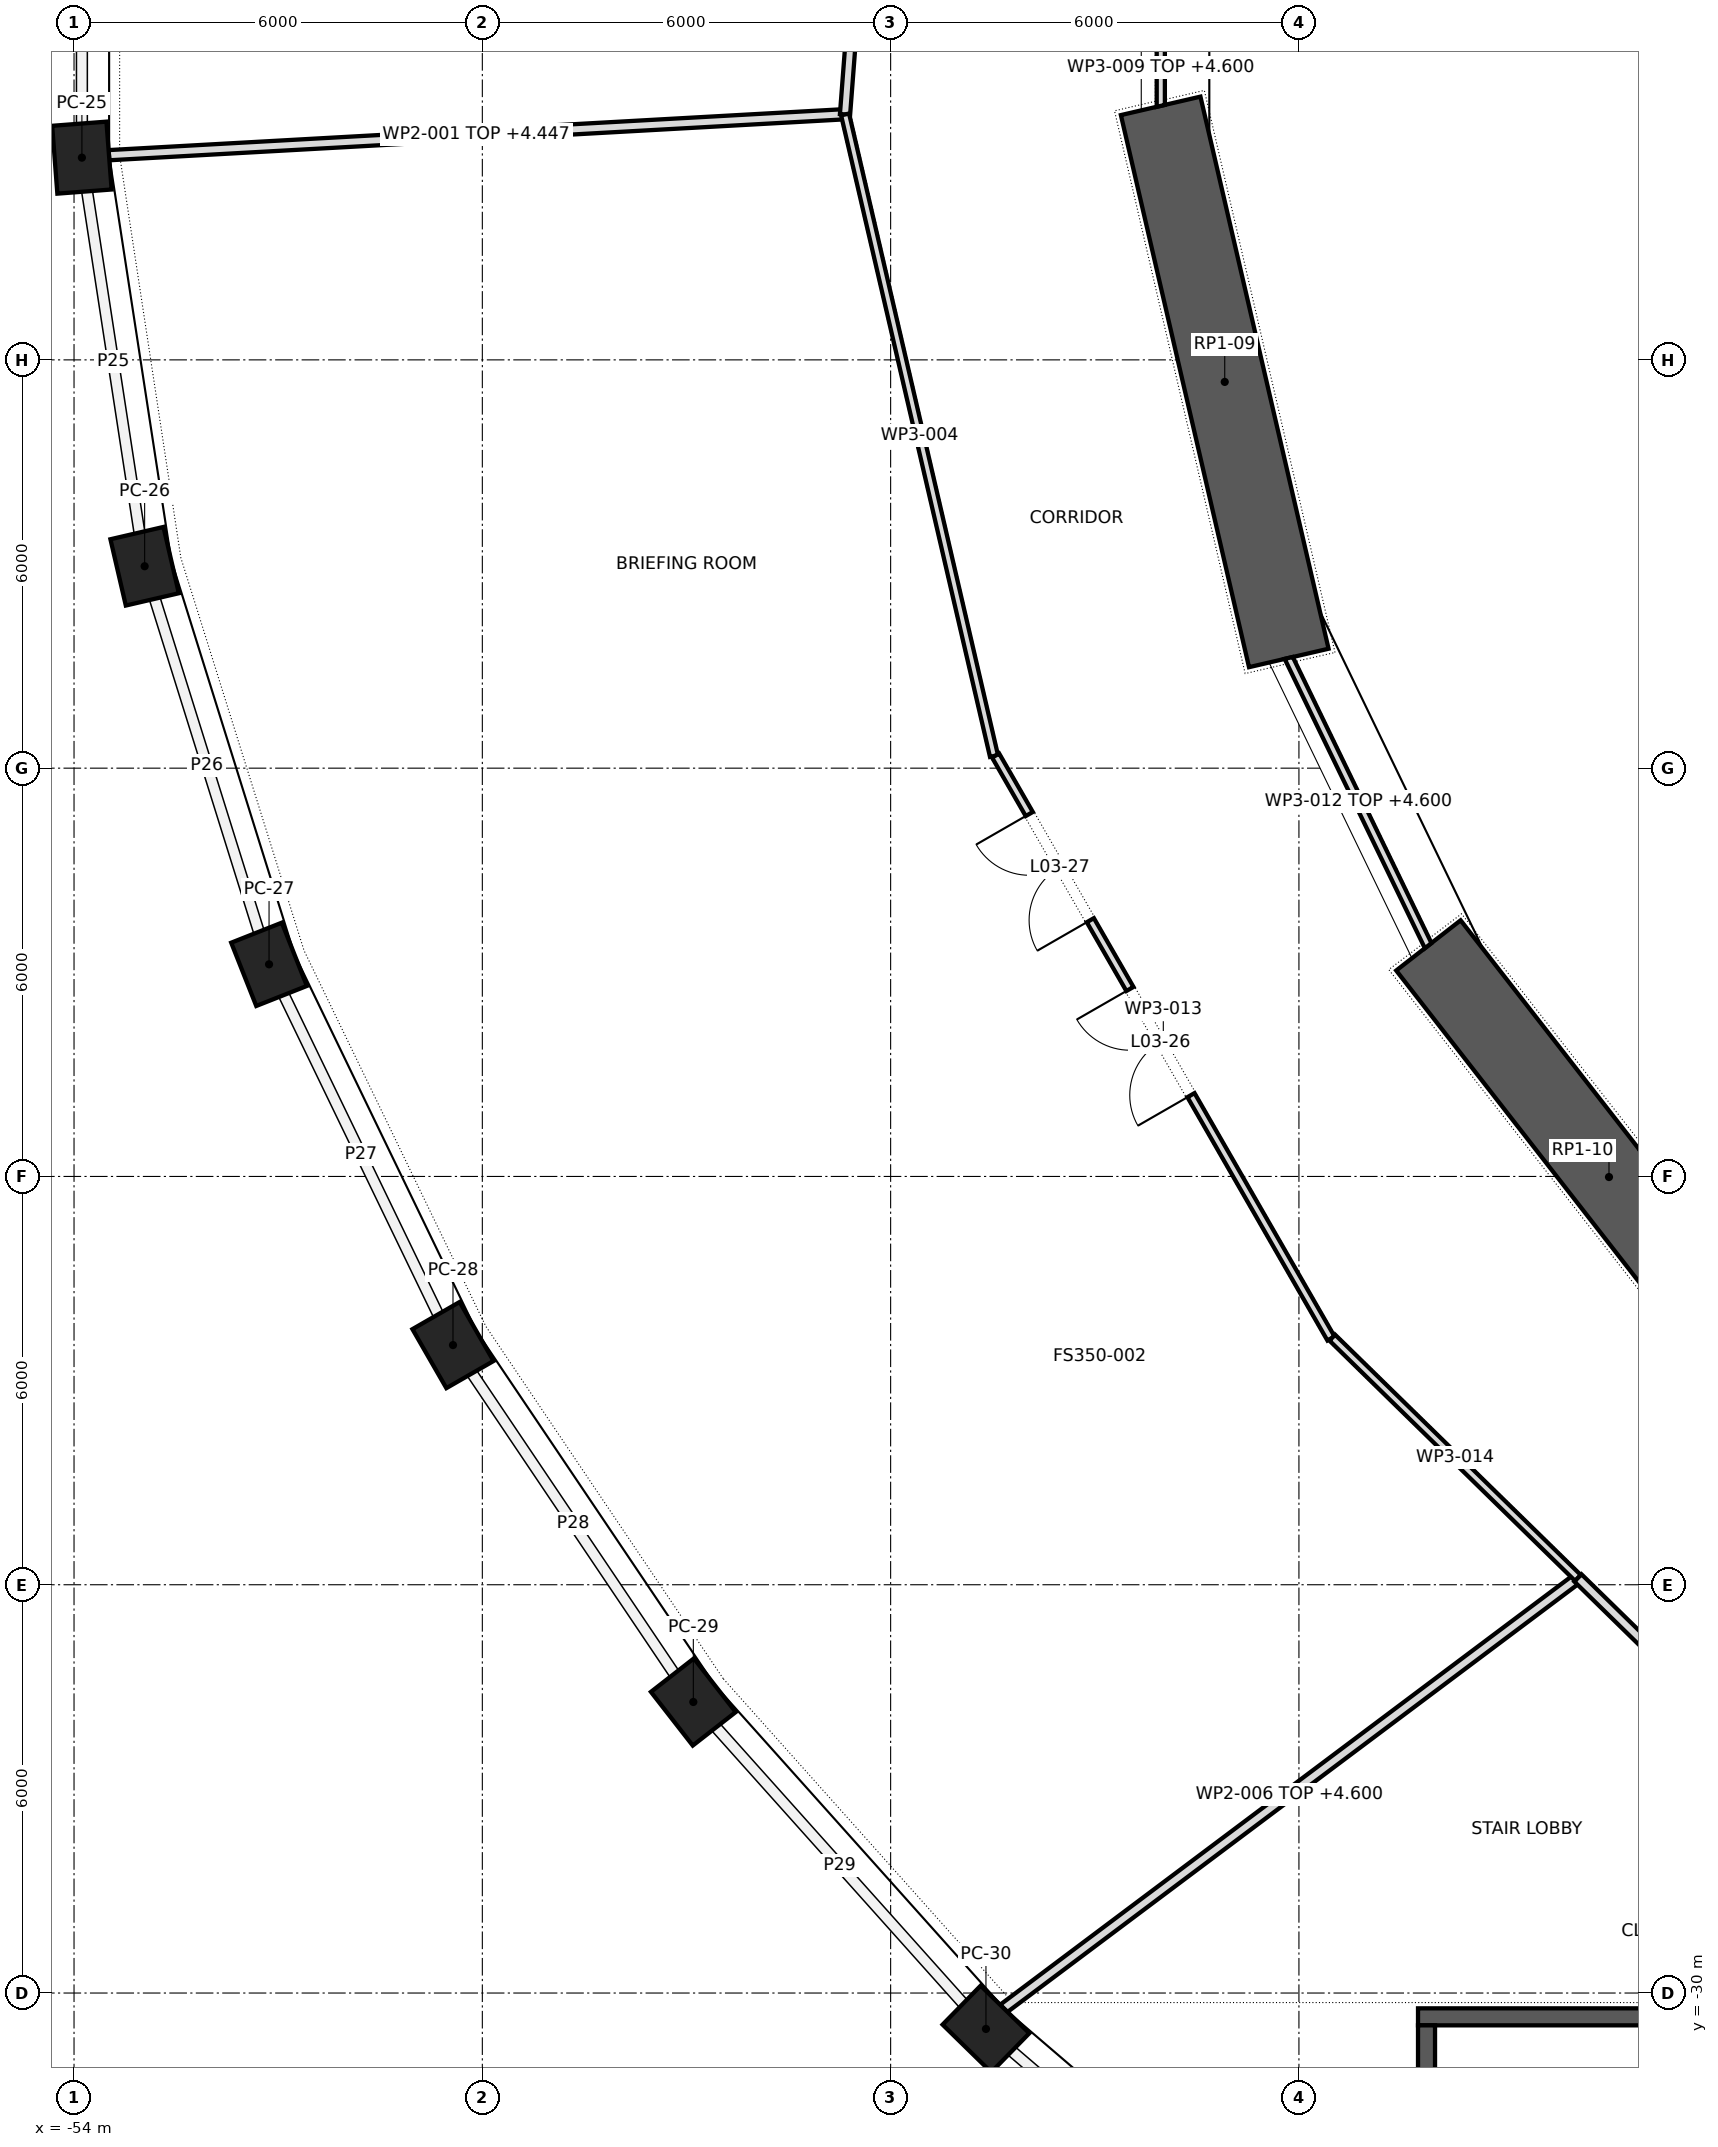
"""IFC4 building model, lengths in metres.
Left out: names, types, materials, properties, quantities, classifications, styles, units other than length and angle.
Written with IfcOpenShell. Run it as: python <this file> out.ifc"""

import sys

from ifc_helpers import new_model, si_unit, direction, frame, frame_2d, origin, origin_2d, place, context, subcontext, project, spatial, polyline, rectangle, outline, extrude, element, fill, save


model = new_model("IFC4")
c1 = context("Model", 3, precision=1e-05, world=origin(), true_north=direction((0.0, 1.0)))
c2 = subcontext(c1, "Body", "Model", "MODEL_VIEW")
j1 = project(units=[si_unit("LENGTHUNIT", "METRE"), si_unit("PLANEANGLEUNIT", "RADIAN")], contexts=[c1])
p1 = place(None, origin())
s1 = spatial("IfcSite", under=j1, at=p1, CompositionType="ELEMENT")
p2 = place(p1, origin())
s2 = spatial("IfcBuilding", under=s1, at=p2, CompositionType="ELEMENT")
p3 = place(p2, frame((0.0, 0.0, 18.0)))
s3 = spatial("IfcBuildingStorey", under=s2, at=p3, CompositionType="ELEMENT", Elevation=18.0)
for number, where, z_axis, x_axis in (
    (1, (-53.885, -3.028, 0.0), (0.0, 0.0, 1.0), (0.076, -0.997, 0.0)),
    (2, (-52.962, -9.033, 0.0), (0.0, 0.0, 1.0), (0.226, -0.974, 0.0)),
    (3, (-51.134, -14.883, 0.0), (0.0, 0.0, 1.0), (0.368, -0.93, 0.0)),
    (4, (-48.431, -20.478, 0.0), (0.0, 0.0, 1.0), (0.499, -0.867, 0.0)),
    (5, (-44.899, -25.723, 0.0), (0.0, 0.0, 1.0), (0.615, -0.789, 0.0)),
    (6, (-40.599, -30.528, 0.0), (0.0, 0.0, 1.0), (0.715, -0.699, 0.0)),
):
    element("IfcColumn", number, at=place(p3, frame(where, z_axis=z_axis, x_axis=x_axis)), inside=s3, PredefinedType="COLUMN", context=c2, shape_type="SweptSolid", body=[
        extrude(rectangle(XDim=1.0, YDim=0.8, at=origin_2d()), origin(), (0.0, 0.0, 1.0), 5.5),
    ])
p4 = place(p3, frame((-38.032, -2.267, 0.0), z_axis=(0.0, 0.0, 1.0), x_axis=(0.226058185805, -0.974113800657, 0.0)))
e7 = element("IfcWall", 7, at=p4, inside=s3, PredefinedType="SHEAR", context=c2, shape_type="SweptSolid", body=[
    extrude(rectangle(XDim=8.329, YDim=1.2, at=frame_2d((4.165, 0.0))), origin(), (0.0, 0.0, 1.0), 5.5),
])
p5 = place(p3, frame((-34.097, -14.605, 0.0), z_axis=(0.0, 0.0, 1.0), x_axis=(0.614825322247, -0.788663314174, 0.0)))
e8 = element("IfcWall", 8, at=p5, inside=s3, PredefinedType="SHEAR", context=c2, shape_type="SweptSolid", body=[
    extrude(rectangle(XDim=8.632, YDim=1.2, at=frame_2d((4.316, 0.0))), origin(), (0.0, 0.0, 1.0), 5.5),
])
p6 = place(p3, frame((-34.25, -30.35, 0.0), z_axis=(0.0, 0.0, 1.0), x_axis=(1.0, 0.0, 0.0)))
e9 = element("IfcWall", 9, at=p6, inside=s3, PredefinedType="SHEAR", context=c2, shape_type="SweptSolid", body=[
    extrude(rectangle(XDim=8.5, YDim=0.25, at=frame_2d((4.25, 0.0))), origin(), (0.0, 0.0, 1.0), 5.2),
])
p7 = place(p3, frame((-34.125, -33.525, 0.0), z_axis=(0.0, 0.0, 1.0), x_axis=(0.0, 1.0, 0.0)))
e10 = element("IfcWall", 10, at=p7, inside=s3, PredefinedType="SHEAR", context=c2, shape_type="SweptSolid", body=[
    extrude(rectangle(XDim=3.05, YDim=0.25, at=frame_2d((1.525, 0.0))), origin(), (0.0, 0.0, 1.0), 5.2),
])
p8 = place(p3, frame((-42.697, -2.392, 0.0), z_axis=(0.0, 0.0, 1.0), x_axis=(-0.998455831687, -0.055551347153, 0.0)))
e11 = element("IfcWall", 11, at=p8, inside=s3, PredefinedType="PARTITIONING", context=c2, shape_type="SweptSolid", body=[
    extrude(outline(polyline([(0.0, -0.075), (10.808, -0.075), (10.805, 0.075), (0.0, 0.075), (0.0, -0.075)])), origin(), (0.0, 0.0, 1.0), 4.447),
])
p9 = place(p3, frame((-42.67, -2.394, 0.0), z_axis=(0.0, 0.0, 1.0), x_axis=(0.076458757176, 0.997072744814, 0.0)))
e12 = element("IfcWall", 12, at=p9, inside=s3, PredefinedType="PARTITIONING", context=c2, shape_type="SweptSolid", body=[
    extrude(rectangle(XDim=9.659, YDim=0.15, at=frame_2d((4.83, 0.0))), origin(), (0.0, 0.0, 1.0), 5.2),
])
p10 = place(p3, frame((-40.481, -11.821, 0.0), z_axis=(0.0, 0.0, 1.0), x_axis=(-0.226066022298, 0.974111982044, 0.0)))
e13 = element("IfcWall", 13, at=p10, inside=s3, PredefinedType="PARTITIONING", context=c2, shape_type="SweptSolid", body=[
    extrude(rectangle(XDim=9.678, YDim=0.12, at=frame_2d((4.839, 0.0))), origin(), (0.0, 0.0, 1.0), 5.2),
])
p11 = place(p3, frame((-40.337, -30.226, 0.0), z_axis=(0.0, 0.0, 1.0), x_axis=(0.800114543622, 0.599847244792, 0.0)))
e14 = element("IfcWall", 14, at=p11, inside=s3, PredefinedType="PARTITIONING", context=c2, shape_type="SweptSolid", body=[
    extrude(outline(polyline([(0.011, -0.075), (10.485, -0.075), (10.485, 0.075), (-0.011, 0.075), (0.011, -0.075)])), origin(), (0.0, 0.0, 1.0), 4.6),
])
p12 = place(p3, frame((-38.03, -1.14, 0.0), z_axis=(0.0, 0.0, 1.0), x_axis=(0.0, -1.0, 0.0)))
e15 = element("IfcWall", 15, at=p12, inside=s3, PredefinedType="PARTITIONING", context=c2, shape_type="SweptSolid", body=[
    extrude(outline(polyline([(0.0, -0.06), (1.142, -0.06), (1.114, 0.06), (0.0, 0.06), (0.0, -0.06)])), origin(), (0.0, 0.0, 1.0), 4.6),
])
p13 = place(p3, frame((-36.15, -10.38, 0.0), z_axis=(0.0, 0.0, 1.0), x_axis=(0.436102687495, -0.899896908518, 0.0)))
e16 = element("IfcWall", 16, at=p13, inside=s3, PredefinedType="PARTITIONING", context=c2, shape_type="SweptSolid", body=[
    extrude(outline(polyline([(-0.014, -0.06), (4.712, -0.06), (4.686, 0.06), (0.014, 0.06), (-0.014, -0.06)])), origin(), (0.0, 0.0, 1.0), 4.6),
])
p14 = place(p3, frame((-35.529, -20.381, 0.0), z_axis=(0.0, 0.0, 1.0), x_axis=(-0.498637746392, 0.866810474021, 0.0)))
e17 = element("IfcWall", 17, at=p14, inside=s3, PredefinedType="PARTITIONING", context=c2, shape_type="SweptSolid", body=[
    extrude(rectangle(XDim=9.882, YDim=0.12, at=frame_2d((4.941, 0.0))), origin(), (0.0, 0.0, 1.0), 5.2),
])
p15 = place(p14, frame((4.125, 0.0, 0.0)))
e18 = element("IfcOpeningElement", 18, at=p15, cuts=e17, PredefinedType="OPENING", context=c2, shape_type="SweptSolid", body=[
    extrude(rectangle(XDim=1.8, YDim=2.1, at=frame_2d((0.9, 1.05))), frame((0.0, 0.072, 0.0), z_axis=(0.0, -1.0, 0.0), x_axis=(1.0, 0.0, 0.0)), (0.0, 0.0, 1.0), 0.144),
])
p16 = place(p14, frame((7.092, 0.0, 0.0)))
e19 = element("IfcOpeningElement", 19, at=p16, cuts=e17, PredefinedType="OPENING", context=c2, shape_type="SweptSolid", body=[
    extrude(rectangle(XDim=1.8, YDim=2.1, at=frame_2d((0.9, 1.05))), frame((0.0, 0.072, 0.0), z_axis=(0.0, -1.0, 0.0), x_axis=(1.0, 0.0, 0.0)), (0.0, 0.0, 1.0), 0.144),
])
p17 = place(p3, frame((-35.51, -20.369, 0.0), z_axis=(0.0, 0.0, 1.0), x_axis=(0.714847158957, -0.699280729987, 0.0)))
e20 = element("IfcWall", 20, at=p17, inside=s3, PredefinedType="PARTITIONING", context=c2, shape_type="SweptSolid", body=[
    extrude(rectangle(XDim=5.05, YDim=0.12, at=frame_2d((2.525, 0.0))), origin(), (0.0, 0.0, 1.0), 5.2),
])
p18 = place(p3, frame((-31.9, -23.9, 0.0), z_axis=(0.0, 0.0, 1.0), x_axis=(0.714809256367, -0.699319474212, 0.0)))
e21 = element("IfcWall", 21, at=p18, inside=s3, PredefinedType="PARTITIONING", context=c2, shape_type="SweptSolid", body=[
    extrude(rectangle(XDim=5.249, YDim=0.15, at=frame_2d((2.624, 0.0))), origin(), (0.0, 0.0, 1.0), 5.2),
])
p19 = place(p15, origin())
e22 = element("IfcDoor", 22, at=p19, inside=s3, OperationType="DOUBLE_DOOR_SINGLE_SWING", PredefinedType="DOOR", context=c2, shape_type="SweptSolid", body=[
    extrude(rectangle(XDim=1.8, YDim=2.1, at=frame_2d((0.9, 1.05))), frame((0.0, 0.025, 0.0), z_axis=(0.0, -1.0, 0.0), x_axis=(1.0, 0.0, 0.0)), (0.0, 0.0, 1.0), 0.05),
])
fill(e18, e22)
p20 = place(p16, origin())
e23 = element("IfcDoor", 23, at=p20, inside=s3, OperationType="DOUBLE_DOOR_SINGLE_SWING", PredefinedType="DOOR", context=c2, shape_type="SweptSolid", body=[
    extrude(rectangle(XDim=1.8, YDim=2.1, at=frame_2d((0.9, 1.05))), frame((0.0, 0.025, 0.0), z_axis=(0.0, -1.0, 0.0), x_axis=(1.0, 0.0, 0.0)), (0.0, 0.0, 1.0), 0.05),
])
fill(e19, e23)
save(model, sys.argv[1])
